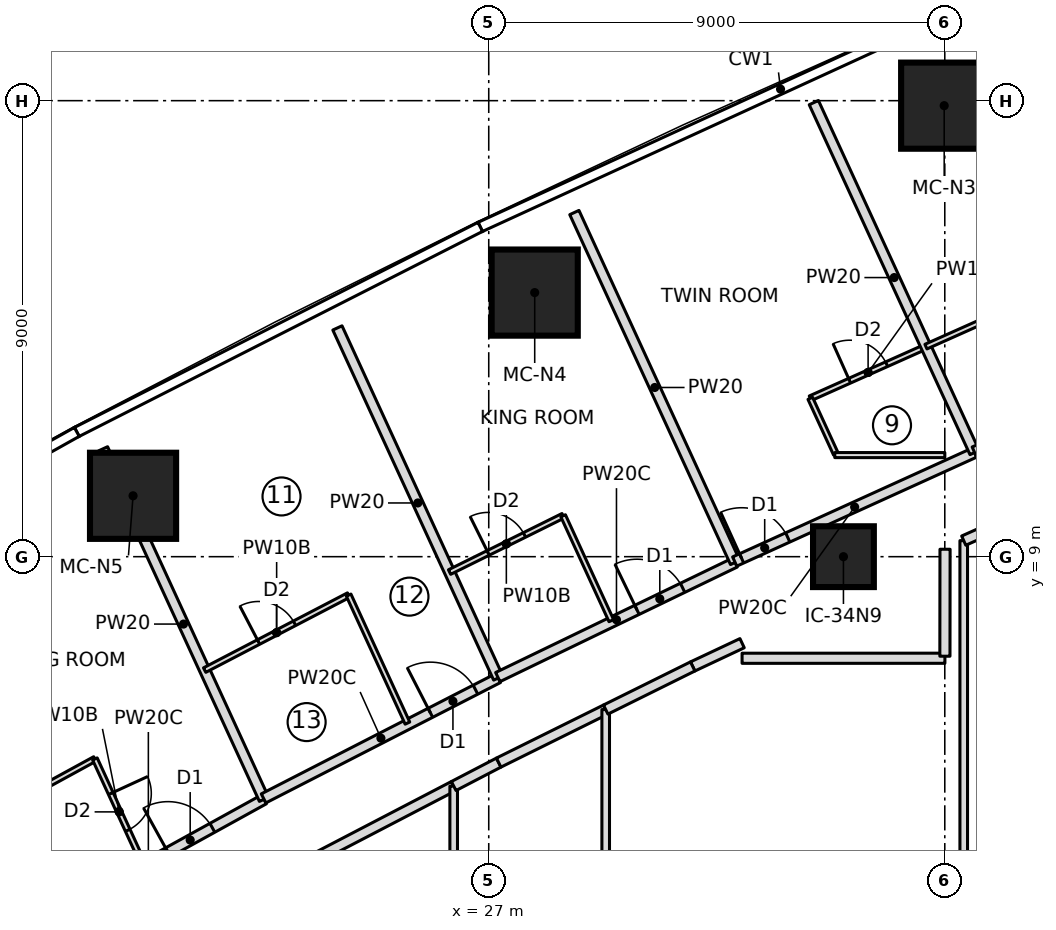
"""IFC4 building model, lengths in metres.
Left out: names, types, materials, properties, quantities, classifications, styles, units other than length and angle.
Written with IfcOpenShell. Run it as: python <this file> out.ifc"""

import sys

from ifc_helpers import new_model, si_unit, direction, frame, frame_2d, origin, origin_2d, place, context, subcontext, project, spatial, rectangle, extrude, element, fill, save


model = new_model("IFC4")
c1 = context("Model", 3, precision=1e-05, world=origin(), true_north=direction((0.0, 1.0)))
c2 = subcontext(c1, "Body", "Model", "MODEL_VIEW")
j1 = project(units=[si_unit("LENGTHUNIT", "METRE"), si_unit("PLANEANGLEUNIT", "RADIAN")], contexts=[c1])
p1 = place(None, origin())
s1 = spatial("IfcSite", under=j1, at=p1, CompositionType="ELEMENT")
p2 = place(p1, origin())
s2 = spatial("IfcBuilding", under=s1, at=p2, CompositionType="ELEMENT")
p3 = place(p2, frame((0.0, 0.0, 116.85)))
s3 = spatial("IfcBuildingStorey", under=s2, at=p3, CompositionType="ELEMENT", Elevation=116.85)
for number, where, z_axis, x_axis in (
    (1, (35.988, 17.902, 0.0), (0.0, 0.0, 1.0), (1.0, 0.0, 0.0)),
    (2, (27.907, 14.212, 0.0), (0.0, 0.0, 1.0), (1.0, 0.0, 0.0)),
    (3, (19.981, 10.202, 0.0), (0.0, 0.0, 1.0), (1.0, 0.0, 0.0)),
):
    element("IfcColumn", number, at=place(p3, frame(where, z_axis=z_axis, x_axis=x_axis)), inside=s3, PredefinedType="COLUMN", context=c2, shape_type="SweptSolid", body=[
        extrude(rectangle(XDim=1.7, YDim=1.7, at=origin_2d()), origin(), (0.0, 0.0, 1.0), 3.55),
    ])
p4 = place(p3, frame((34.0, 9.0, 0.0), z_axis=(0.0, 0.0, 1.0), x_axis=(1.0, 0.0, 0.0)))
e4 = element("IfcColumn", 4, at=p4, inside=s3, PredefinedType="COLUMN", context=c2, shape_type="SweptSolid", body=[
    extrude(rectangle(XDim=1.2, YDim=1.2, at=origin_2d()), origin(), (0.0, 0.0, 1.0), 3.55),
])
p5 = place(p3, frame((18.0, 1.692, 0.0), z_axis=(0.0, 0.0, 1.0), x_axis=(0.875501185112, 0.483215971246, 0.0)))
e5 = element("IfcWall", 5, at=p5, inside=s3, PredefinedType="PARTITIONING", context=c2, shape_type="SweptSolid", body=[
    extrude(rectangle(XDim=5.214, YDim=0.2, at=frame_2d((2.607, 0.0))), origin(), (0.0, 0.0, 1.0), 3.15),
])
p6 = place(p5, frame((3.05, 0.0, 0.0)))
e6 = element("IfcOpeningElement", 6, at=p6, cuts=e5, PredefinedType="OPENING", context=c2, shape_type="SweptSolid", body=[
    extrude(rectangle(XDim=1.0, YDim=2.1, at=frame_2d((0.5, 1.05))), frame((0.0, 0.11, 0.0), z_axis=(0.0, -1.0, 0.0), x_axis=(1.0, 0.0, 0.0)), (0.0, 0.0, 1.0), 0.22),
])
p7 = place(p3, frame((17.801, 4.229, 0.0), z_axis=(0.0, 0.0, 1.0), x_axis=(0.877424481957, 0.479714788663, 0.0)))
e7 = element("IfcWall", 7, at=p7, inside=s3, PredefinedType="PARTITIONING", context=c2, shape_type="SweptSolid", body=[
    extrude(rectangle(XDim=1.625, YDim=0.1, at=frame_2d((0.813, 0.0))), origin(), (0.0, 0.0, 1.0), 3.15),
])
p8 = place(p3, frame((19.228, 5.008, 0.0), z_axis=(0.0, 0.0, 1.0), x_axis=(0.417450047292, -0.908699872354, 0.0)))
e8 = element("IfcWall", 8, at=p8, inside=s3, PredefinedType="PARTITIONING", context=c2, shape_type="SweptSolid", body=[
    extrude(rectangle(XDim=2.283, YDim=0.1, at=frame_2d((1.141, 0.0))), origin(), (0.0, 0.0, 1.0), 3.15),
])
p9 = place(p8, frame((0.75, 0.0, 0.0)))
e9 = element("IfcOpeningElement", 9, at=p9, cuts=e8, PredefinedType="OPENING", context=c2, shape_type="SweptSolid", body=[
    extrude(rectangle(XDim=0.8, YDim=2.1, at=frame_2d((0.4, 1.05))), frame((0.0, 0.06, 0.0), z_axis=(0.0, -1.0, 0.0), x_axis=(1.0, 0.0, 0.0)), (0.0, 0.0, 1.0), 0.12),
])
p10 = place(p3, frame((22.565, 4.211, 0.0), z_axis=(0.0, 0.0, 1.0), x_axis=(-0.41742645501, 0.908710710104, 0.0)))
e10 = element("IfcWall", 10, at=p10, inside=s3, PredefinedType="PARTITIONING", context=c2, shape_type="SweptSolid", body=[
    extrude(rectangle(XDim=7.613, YDim=0.2, at=frame_2d((3.806, 0.0))), origin(), (0.0, 0.0, 1.0), 3.15),
])
p11 = place(p3, frame((22.557, 4.229, 0.0), z_axis=(0.0, 0.0, 1.0), x_axis=(0.889706581948, 0.456532800617, 0.0)))
e11 = element("IfcWall", 11, at=p11, inside=s3, PredefinedType="PARTITIONING", context=c2, shape_type="SweptSolid", body=[
    extrude(rectangle(XDim=5.205, YDim=0.2, at=frame_2d((2.603, 0.0))), origin(), (0.0, 0.0, 1.0), 3.15),
])
p12 = place(p11, frame((3.7, 0.0, 0.0)))
e12 = element("IfcOpeningElement", 12, at=p12, cuts=e11, PredefinedType="OPENING", context=c2, shape_type="SweptSolid", body=[
    extrude(rectangle(XDim=1.0, YDim=2.1, at=frame_2d((0.5, 1.05))), frame((0.0, 0.11, 0.0), z_axis=(0.0, -1.0, 0.0), x_axis=(1.0, 0.0, 0.0)), (0.0, 0.0, 1.0), 0.22),
])
p13 = place(p3, frame((21.394, 6.762, 0.0), z_axis=(0.0, 0.0, 1.0), x_axis=(0.886897171809, 0.461966889114, 0.0)))
e13 = element("IfcWall", 13, at=p13, inside=s3, PredefinedType="PARTITIONING", context=c2, shape_type="SweptSolid", body=[
    extrude(rectangle(XDim=3.204, YDim=0.1, at=frame_2d((1.602, 0.0))), origin(), (0.0, 0.0, 1.0), 3.15),
])
p14 = place(p13, frame((1.2, 0.0, 0.0)))
e14 = element("IfcOpeningElement", 14, at=p14, cuts=e13, PredefinedType="OPENING", context=c2, shape_type="SweptSolid", body=[
    extrude(rectangle(XDim=0.8, YDim=2.1, at=frame_2d((0.4, 1.05))), frame((0.0, 0.06, 0.0), z_axis=(0.0, -1.0, 0.0), x_axis=(1.0, 0.0, 0.0)), (0.0, 0.0, 1.0), 0.12),
])
p15 = place(p3, frame((24.235, 8.242, 0.0), z_axis=(0.0, 0.0, 1.0), x_axis=(0.417359077977, -0.908741657475, 0.0)))
e15 = element("IfcWall", 15, at=p15, inside=s3, PredefinedType="PARTITIONING", context=c2, shape_type="SweptSolid", body=[
    extrude(rectangle(XDim=2.78, YDim=0.1, at=frame_2d((1.39, 0.0))), origin(), (0.0, 0.0, 1.0), 3.15),
])
p16 = place(p3, frame((27.188, 6.606, 0.0), z_axis=(0.0, 0.0, 1.0), x_axis=(-0.417428513692, 0.908709764422, 0.0)))
e16 = element("IfcWall", 16, at=p16, inside=s3, PredefinedType="PARTITIONING", context=c2, shape_type="SweptSolid", body=[
    extrude(rectangle(XDim=7.603, YDim=0.2, at=frame_2d((3.802, 0.0))), origin(), (0.0, 0.0, 1.0), 3.15),
])
p17 = place(p3, frame((27.179, 6.624, 0.0), z_axis=(0.0, 0.0, 1.0), x_axis=(0.900446408639, 0.434966970204, 0.0)))
e17 = element("IfcWall", 17, at=p17, inside=s3, PredefinedType="PARTITIONING", context=c2, shape_type="SweptSolid", body=[
    extrude(rectangle(XDim=5.201, YDim=0.2, at=frame_2d((2.601, 0.0))), origin(), (0.0, 0.0, 1.0), 3.15),
])
p18 = place(p17, frame((3.05, 0.0, 0.0)))
e18 = element("IfcOpeningElement", 18, at=p18, cuts=e17, PredefinedType="OPENING", context=c2, shape_type="SweptSolid", body=[
    extrude(rectangle(XDim=1.0, YDim=2.1, at=frame_2d((0.5, 1.05))), frame((0.0, 0.11, 0.0), z_axis=(0.0, -1.0, 0.0), x_axis=(1.0, 0.0, 0.0)), (0.0, 0.0, 1.0), 0.22),
])
p19 = place(p3, frame((26.227, 8.697, 0.0), z_axis=(0.0, 0.0, 1.0), x_axis=(0.895944857815, 0.444165297784, 0.0)))
e19 = element("IfcWall", 19, at=p19, inside=s3, PredefinedType="PARTITIONING", context=c2, shape_type="SweptSolid", body=[
    extrude(rectangle(XDim=2.501, YDim=0.1, at=frame_2d((1.25, 0.0))), origin(), (0.0, 0.0, 1.0), 3.15),
])
p20 = place(p19, frame((0.85, 0.0, 0.0)))
e20 = element("IfcOpeningElement", 20, at=p20, cuts=e19, PredefinedType="OPENING", context=c2, shape_type="SweptSolid", body=[
    extrude(rectangle(XDim=0.8, YDim=2.1, at=frame_2d((0.4, 1.05))), frame((0.0, 0.06, 0.0), z_axis=(0.0, -1.0, 0.0), x_axis=(1.0, 0.0, 0.0)), (0.0, 0.0, 1.0), 0.12),
])
p21 = place(p3, frame((28.468, 9.807, 0.0), z_axis=(0.0, 0.0, 1.0), x_axis=(0.417344701557, -0.908748260016, 0.0)))
e21 = element("IfcWall", 21, at=p21, inside=s3, PredefinedType="PARTITIONING", context=c2, shape_type="SweptSolid", body=[
    extrude(rectangle(XDim=2.278, YDim=0.1, at=frame_2d((1.139, 0.0))), origin(), (0.0, 0.0, 1.0), 3.15),
])
p22 = place(p3, frame((31.862, 8.886, 0.0), z_axis=(0.0, 0.0, 1.0), x_axis=(-0.417429919618, 0.90870911859, 0.0)))
e22 = element("IfcWall", 22, at=p22, inside=s3, PredefinedType="PARTITIONING", context=c2, shape_type="SweptSolid", body=[
    extrude(rectangle(XDim=7.6, YDim=0.2, at=frame_2d((3.8, 0.0))), origin(), (0.0, 0.0, 1.0), 3.15),
])
p23 = place(p3, frame((31.854, 8.904, 0.0), z_axis=(0.0, 0.0, 1.0), x_axis=(0.910421138148, 0.413682669704, 0.0)))
e23 = element("IfcWall", 23, at=p23, inside=s3, PredefinedType="PARTITIONING", context=c2, shape_type="SweptSolid", body=[
    extrude(rectangle(XDim=5.2, YDim=0.2, at=frame_2d((2.6, 0.0))), origin(), (0.0, 0.0, 1.0), 3.15),
])
p24 = place(p23, frame((0.15, 0.0, 0.0)))
e24 = element("IfcOpeningElement", 24, at=p24, cuts=e23, PredefinedType="OPENING", context=c2, shape_type="SweptSolid", body=[
    extrude(rectangle(XDim=1.0, YDim=2.1, at=frame_2d((0.5, 1.05))), frame((0.0, 0.11, 0.0), z_axis=(0.0, -1.0, 0.0), x_axis=(1.0, 0.0, 0.0)), (0.0, 0.0, 1.0), 0.22),
])
p25 = place(p3, frame((33.345, 12.126, 0.0), z_axis=(0.0, 0.0, 1.0), x_axis=(0.913052819539, 0.407841327885, 0.0)))
e25 = element("IfcWall", 25, at=p25, inside=s3, PredefinedType="PARTITIONING", context=c2, shape_type="SweptSolid", body=[
    extrude(rectangle(XDim=2.5, YDim=0.1, at=frame_2d((1.25, 0.0))), origin(), (0.0, 0.0, 1.0), 3.15),
])
p26 = place(p25, frame((0.85, 0.0, 0.0)))
e26 = element("IfcOpeningElement", 26, at=p26, cuts=e25, PredefinedType="OPENING", context=c2, shape_type="SweptSolid", body=[
    extrude(rectangle(XDim=0.8, YDim=2.1, at=frame_2d((0.4, 1.05))), frame((0.0, 0.06, 0.0), z_axis=(0.0, -1.0, 0.0), x_axis=(1.0, 0.0, 0.0)), (0.0, 0.0, 1.0), 0.12),
])
p27 = place(p3, frame((33.852, 11.024, 0.0), z_axis=(0.0, 0.0, 1.0), x_axis=(-0.417500171551, 0.908676843963, 0.0)))
e27 = element("IfcWall", 27, at=p27, inside=s3, PredefinedType="PARTITIONING", context=c2, shape_type="SweptSolid", body=[
    extrude(rectangle(XDim=1.213, YDim=0.1, at=frame_2d((0.606, 0.0))), origin(), (0.0, 0.0, 1.0), 3.15),
])
p28 = place(p3, frame((36.588, 11.055, 0.0), z_axis=(0.0, 0.0, 1.0), x_axis=(-0.417429919618, 0.90870911859, 0.0)))
e28 = element("IfcWall", 28, at=p28, inside=s3, PredefinedType="PARTITIONING", context=c2, shape_type="SweptSolid", body=[
    extrude(rectangle(XDim=7.6, YDim=0.2, at=frame_2d((3.8, 0.0))), origin(), (0.0, 0.0, 1.0), 3.15),
])
p29 = place(p3, frame((41.357, 13.132, 0.0), z_axis=(0.0, 0.0, 1.0), x_axis=(-0.918351735125, -0.395765196288, 0.0)))
e29 = element("IfcWall", 29, at=p29, inside=s3, PredefinedType="PARTITIONING", context=c2, shape_type="SweptSolid", body=[
    extrude(rectangle(XDim=5.202, YDim=0.2, at=frame_2d((2.601, 0.0))), origin(), (0.0, 0.0, 1.0), 3.15),
])
p30 = place(p29, frame((0.35, 0.0, 0.0)))
e30 = element("IfcOpeningElement", 30, at=p30, cuts=e29, PredefinedType="OPENING", context=c2, shape_type="SweptSolid", body=[
    extrude(rectangle(XDim=1.0, YDim=2.1, at=frame_2d((0.5, 1.05))), frame((0.0, 0.11, 0.0), z_axis=(0.0, -1.0, 0.0), x_axis=(1.0, 0.0, 0.0)), (0.0, 0.0, 1.0), 0.22),
])
p31 = place(p3, frame((35.628, 13.146, 0.0), z_axis=(0.0, 0.0, 1.0), x_axis=(0.913023709843, 0.407906490833, 0.0)))
e31 = element("IfcWall", 31, at=p31, inside=s3, PredefinedType="PARTITIONING", context=c2, shape_type="SweptSolid", body=[
    extrude(rectangle(XDim=1.806, YDim=0.1, at=frame_2d((0.903, 0.0))), origin(), (0.0, 0.0, 1.0), 3.15),
])
p32 = place(p3, frame((23.407, 2.962, 0.0), z_axis=(0.0, 0.0, 1.0), x_axis=(0.886901344009, 0.461958879116, 0.0)))
e32 = element("IfcWall", 32, at=p32, inside=s3, PredefinedType="PARTITIONING", context=c2, shape_type="SweptSolid", body=[
    extrude(rectangle(XDim=3.271, YDim=0.2, at=frame_2d((1.636, 0.0))), origin(), (0.0, 0.0, 1.0), 3.15),
])
p33 = place(p3, frame((26.308, -4.473, 0.0), z_axis=(0.0, 0.0, 1.0), x_axis=(0.0, 1.0, 0.0)))
e33 = element("IfcWall", 33, at=p33, inside=s3, PredefinedType="PARTITIONING", context=c2, shape_type="SweptSolid", body=[
    extrude(rectangle(XDim=8.946, YDim=0.15, at=frame_2d((4.473, 0.0))), origin(), (0.0, 0.0, 1.0), 3.15),
])
p34 = place(p3, frame((26.308, 4.473, 0.0), z_axis=(0.0, 0.0, 1.0), x_axis=(0.886893275317, 0.461974369633, 0.0)))
e34 = element("IfcWall", 34, at=p34, inside=s3, PredefinedType="PARTITIONING", context=c2, shape_type="SweptSolid", body=[
    extrude(rectangle(XDim=1.001, YDim=0.2, at=frame_2d((0.501, 0.0))), origin(), (0.0, 0.0, 1.0), 3.15),
])
p35 = place(p3, frame((27.196, 4.936, 0.0), z_axis=(0.0, 0.0, 1.0), x_axis=(0.895954899574, 0.444145041546, 0.0)))
e35 = element("IfcWall", 35, at=p35, inside=s3, PredefinedType="PARTITIONING", context=c2, shape_type="SweptSolid", body=[
    extrude(rectangle(XDim=2.357, YDim=0.2, at=frame_2d((1.179, 0.0))), origin(), (0.0, 0.0, 1.0), 3.15),
])
p36 = place(p3, frame((29.308, -5.983, 0.0), z_axis=(0.0, 0.0, 1.0), x_axis=(0.0, 1.0, 0.0)))
e36 = element("IfcWall", 36, at=p36, inside=s3, PredefinedType="PARTITIONING", context=c2, shape_type="SweptSolid", body=[
    extrude(rectangle(XDim=11.965, YDim=0.15, at=frame_2d((5.983, 0.0))), origin(), (0.0, 0.0, 1.0), 3.15),
])
p37 = place(p3, frame((31.025, 6.833, 0.0), z_axis=(0.0, 0.0, 1.0), x_axis=(0.904690325494, 0.426069730159, 0.0)))
e37 = element("IfcWall", 37, at=p37, inside=s3, PredefinedType="PARTITIONING", context=c2, shape_type="SweptSolid", body=[
    extrude(rectangle(XDim=1.078, YDim=0.2, at=frame_2d((0.539, 0.0))), origin(), (0.0, 0.0, 1.0), 3.15),
])
p38 = place(p3, frame((29.308, 5.983, 0.0), z_axis=(0.0, 0.0, 1.0), x_axis=(0.896001589052, 0.444050844404, 0.0)))
e38 = element("IfcWall", 38, at=p38, inside=s3, PredefinedType="PARTITIONING", context=c2, shape_type="SweptSolid", body=[
    extrude(rectangle(XDim=1.916, YDim=0.2, at=frame_2d((0.958, 0.0))), origin(), (0.0, 0.0, 1.0), 3.15),
])
p39 = place(p3, frame((36.374, -9.317, 0.0), z_axis=(0.0, 0.0, 1.0), x_axis=(0.0, 1.0, 0.0)))
e39 = element("IfcWall", 39, at=p39, inside=s3, PredefinedType="PARTITIONING", context=c2, shape_type="SweptSolid", body=[
    extrude(rectangle(XDim=18.634, YDim=0.15, at=frame_2d((9.317, 0.0))), origin(), (0.0, 0.0, 1.0), 3.15),
])
p40 = place(p3, frame((36.374, 9.317, 0.0), z_axis=(0.0, 0.0, 1.0), x_axis=(0.913030623494, 0.407891015544, 0.0)))
e40 = element("IfcWall", 40, at=p40, inside=s3, PredefinedType="PARTITIONING", context=c2, shape_type="SweptSolid", body=[
    extrude(rectangle(XDim=2.648, YDim=0.2, at=frame_2d((1.324, 0.0))), origin(), (0.0, 0.0, 1.0), 3.15),
])
p41 = place(p3, frame((36.0, 11.005, 0.0), z_axis=(0.0, 0.0, 1.0), x_axis=(-1.0, 0.0, 0.0)))
e41 = element("IfcWall", 41, at=p41, inside=s3, PredefinedType="PARTITIONING", context=c2, shape_type="SweptSolid", body=[
    extrude(rectangle(XDim=2.172, YDim=0.1, at=frame_2d((1.086, 0.0))), origin(), (0.0, 0.0, 1.0), 3.15),
])
p42 = place(p3, frame((32.0, 6.995, 0.0), z_axis=(0.0, 0.0, 1.0), x_axis=(0.99999999256, 0.00012198097, 0.0)))
e42 = element("IfcWall", 42, at=p42, inside=s3, PredefinedType="PARTITIONING", context=c2, shape_type="SweptSolid", body=[
    extrude(rectangle(XDim=4.003, YDim=0.2, at=frame_2d((2.001, 0.0))), origin(), (0.0, 0.0, 1.0), 3.15),
])
p43 = place(p3, frame((36.002, 7.036, 0.0), z_axis=(0.0, 0.0, 1.0), x_axis=(0.001156603436, 0.999999331134, 0.0)))
e43 = element("IfcWall", 43, at=p43, inside=s3, PredefinedType="PARTITIONING", context=c2, shape_type="SweptSolid", body=[
    extrude(rectangle(XDim=2.111, YDim=0.2, at=frame_2d((1.055, 0.0))), origin(), (0.0, 0.0, 1.0), 3.15),
])
p44 = place(p9, origin())
e44 = element("IfcDoor", 44, at=p44, inside=s3, OperationType="SINGLE_SWING_LEFT", PredefinedType="DOOR", context=c2, shape_type="SweptSolid", body=[
    extrude(rectangle(XDim=0.8, YDim=2.1, at=frame_2d((0.4, 1.05))), frame((0.0, 0.025, 0.0), z_axis=(0.0, -1.0, 0.0), x_axis=(1.0, 0.0, 0.0)), (0.0, 0.0, 1.0), 0.05),
])
fill(e9, e44)
p45 = place(p6, origin())
e45 = element("IfcDoor", 45, at=p45, inside=s3, OperationType="SINGLE_SWING_LEFT", PredefinedType="DOOR", context=c2, shape_type="SweptSolid", body=[
    extrude(rectangle(XDim=1.0, YDim=2.1, at=frame_2d((0.5, 1.05))), frame((0.0, 0.025, 0.0), z_axis=(0.0, -1.0, 0.0), x_axis=(1.0, 0.0, 0.0)), (0.0, 0.0, 1.0), 0.05),
])
fill(e6, e45)
p46 = place(p14, origin())
e46 = element("IfcDoor", 46, at=p46, inside=s3, OperationType="SINGLE_SWING_LEFT", PredefinedType="DOOR", context=c2, shape_type="SweptSolid", body=[
    extrude(rectangle(XDim=0.8, YDim=2.1, at=frame_2d((0.4, 1.05))), frame((0.0, 0.025, 0.0), z_axis=(0.0, -1.0, 0.0), x_axis=(1.0, 0.0, 0.0)), (0.0, 0.0, 1.0), 0.05),
])
fill(e14, e46)
p47 = place(p12, origin())
e47 = element("IfcDoor", 47, at=p47, inside=s3, OperationType="SINGLE_SWING_LEFT", PredefinedType="DOOR", context=c2, shape_type="SweptSolid", body=[
    extrude(rectangle(XDim=1.0, YDim=2.1, at=frame_2d((0.5, 1.05))), frame((0.0, 0.025, 0.0), z_axis=(0.0, -1.0, 0.0), x_axis=(1.0, 0.0, 0.0)), (0.0, 0.0, 1.0), 0.05),
])
fill(e12, e47)
p48 = place(p20, origin())
e48 = element("IfcDoor", 48, at=p48, inside=s3, OperationType="SINGLE_SWING_LEFT", PredefinedType="DOOR", context=c2, shape_type="SweptSolid", body=[
    extrude(rectangle(XDim=0.8, YDim=2.1, at=frame_2d((0.4, 1.05))), frame((0.0, 0.025, 0.0), z_axis=(0.0, -1.0, 0.0), x_axis=(1.0, 0.0, 0.0)), (0.0, 0.0, 1.0), 0.05),
])
fill(e20, e48)
p49 = place(p18, origin())
e49 = element("IfcDoor", 49, at=p49, inside=s3, OperationType="SINGLE_SWING_LEFT", PredefinedType="DOOR", context=c2, shape_type="SweptSolid", body=[
    extrude(rectangle(XDim=1.0, YDim=2.1, at=frame_2d((0.5, 1.05))), frame((0.0, 0.025, 0.0), z_axis=(0.0, -1.0, 0.0), x_axis=(1.0, 0.0, 0.0)), (0.0, 0.0, 1.0), 0.05),
])
fill(e18, e49)
p50 = place(p26, origin())
e50 = element("IfcDoor", 50, at=p50, inside=s3, OperationType="SINGLE_SWING_LEFT", PredefinedType="DOOR", context=c2, shape_type="SweptSolid", body=[
    extrude(rectangle(XDim=0.8, YDim=2.1, at=frame_2d((0.4, 1.05))), frame((0.0, 0.025, 0.0), z_axis=(0.0, -1.0, 0.0), x_axis=(1.0, 0.0, 0.0)), (0.0, 0.0, 1.0), 0.05),
])
fill(e26, e50)
p51 = place(p24, origin())
e51 = element("IfcDoor", 51, at=p51, inside=s3, OperationType="SINGLE_SWING_LEFT", PredefinedType="DOOR", context=c2, shape_type="SweptSolid", body=[
    extrude(rectangle(XDim=1.0, YDim=2.1, at=frame_2d((0.5, 1.05))), frame((0.0, 0.025, 0.0), z_axis=(0.0, -1.0, 0.0), x_axis=(1.0, 0.0, 0.0)), (0.0, 0.0, 1.0), 0.05),
])
fill(e24, e51)
save(model, sys.argv[1])
